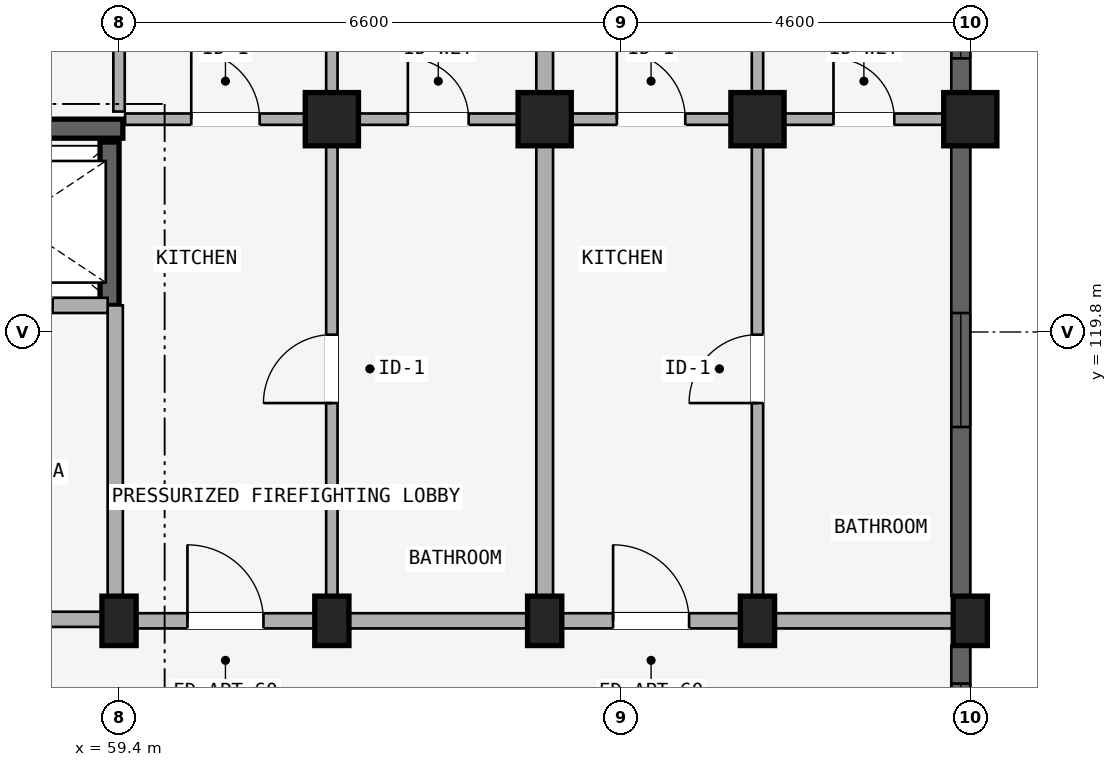
"""IFC4 building model, lengths in metres.
Left out: names, types, materials, properties, quantities, classifications, styles, units other than length and angle.
Written with IfcOpenShell. Run it as: python <this file> out.ifc"""

import sys

from ifc_helpers import new_model, si_unit, direction, frame, frame_2d, origin, origin_2d, place, context, subcontext, project, spatial, rectangle, extrude, element, fill, save


model = new_model("IFC4")
c1 = context("Model", 3, precision=1e-05, world=origin(), true_north=direction((0.0, 1.0)))
c2 = subcontext(c1, "Body", "Model", "MODEL_VIEW")
j1 = project(units=[si_unit("LENGTHUNIT", "METRE"), si_unit("PLANEANGLEUNIT", "RADIAN")], contexts=[c1])
p1 = place(None, origin())
s1 = spatial("IfcSite", under=j1, at=p1, CompositionType="ELEMENT")
p2 = place(p1, origin())
s2 = spatial("IfcBuilding", under=s1, at=p2, CompositionType="ELEMENT")
p3 = place(p2, frame((0.0, 0.0, 27.6)))
s3 = spatial("IfcBuildingStorey", under=s2, at=p3, CompositionType="ELEMENT", Elevation=27.6)
p4 = place(p3, frame((56.65, 122.475, 0.0), z_axis=(0.0, 0.0, 1.0), x_axis=(1.0, 0.0, 0.0)))
e1 = element("IfcWall", 1, at=p4, inside=s3, PredefinedType="SHEAR", context=c2, shape_type="SweptSolid", body=[
    extrude(rectangle(XDim=2.8, YDim=0.25, at=frame_2d((1.4, 0.0))), origin(), (0.0, 0.0, 1.0), 2.93),
])
p5 = place(p3, frame((59.275, 120.15, 0.0), z_axis=(0.0, 0.0, 1.0), x_axis=(0.0, 1.0, 0.0)))
e2 = element("IfcWall", 2, at=p5, inside=s3, PredefinedType="SHEAR", context=c2, shape_type="SweptSolid", body=[
    extrude(rectangle(XDim=2.15, YDim=0.25, at=frame_2d((1.075, 0.0))), origin(), (0.0, 0.0, 1.0), 2.93),
])
for number, where, z_axis, x_axis in (
    (3, (59.4, 116.0, 0.0), (0.0, 0.0, 1.0), (1.0, 0.0, 0.0)),
    (4, (62.2, 116.0, 0.0), (0.0, 0.0, 1.0), (1.0, 0.0, 0.0)),
):
    element("IfcColumn", number, at=place(p3, frame(where, z_axis=z_axis, x_axis=x_axis)), inside=s3, PredefinedType="COLUMN", context=c2, shape_type="SweptSolid", body=[
        extrude(rectangle(XDim=0.45, YDim=0.65, at=origin_2d()), origin(), (0.0, 0.0, 1.0), 2.93),
    ])
p6 = place(p3, frame((62.2, 122.6, 0.0), z_axis=(0.0, 0.0, 1.0), x_axis=(1.0, 0.0, 0.0)))
e5 = element("IfcColumn", 5, at=p6, inside=s3, PredefinedType="COLUMN", context=c2, shape_type="SweptSolid", body=[
    extrude(rectangle(XDim=0.7, YDim=0.7, at=origin_2d()), origin(), (0.0, 0.0, 1.0), 2.93),
])
p7 = place(p3, frame((65.0, 116.0, 0.0), z_axis=(0.0, 0.0, 1.0), x_axis=(1.0, 0.0, 0.0)))
e6 = element("IfcColumn", 6, at=p7, inside=s3, PredefinedType="COLUMN", context=c2, shape_type="SweptSolid", body=[
    extrude(rectangle(XDim=0.45, YDim=0.65, at=origin_2d()), origin(), (0.0, 0.0, 1.0), 2.93),
])
p8 = place(p3, frame((65.0, 122.6, 0.0), z_axis=(0.0, 0.0, 1.0), x_axis=(1.0, 0.0, 0.0)))
e7 = element("IfcColumn", 7, at=p8, inside=s3, PredefinedType="COLUMN", context=c2, shape_type="SweptSolid", body=[
    extrude(rectangle(XDim=0.7, YDim=0.7, at=origin_2d()), origin(), (0.0, 0.0, 1.0), 2.93),
])
p9 = place(p3, frame((67.8, 116.0, 0.0), z_axis=(0.0, 0.0, 1.0), x_axis=(1.0, 0.0, 0.0)))
e8 = element("IfcColumn", 8, at=p9, inside=s3, PredefinedType="COLUMN", context=c2, shape_type="SweptSolid", body=[
    extrude(rectangle(XDim=0.45, YDim=0.65, at=origin_2d()), origin(), (0.0, 0.0, 1.0), 2.93),
])
p10 = place(p3, frame((67.8, 122.6, 0.0), z_axis=(0.0, 0.0, 1.0), x_axis=(1.0, 0.0, 0.0)))
e9 = element("IfcColumn", 9, at=p10, inside=s3, PredefinedType="COLUMN", context=c2, shape_type="SweptSolid", body=[
    extrude(rectangle(XDim=0.7, YDim=0.7, at=origin_2d()), origin(), (0.0, 0.0, 1.0), 2.93),
])
p11 = place(p3, frame((70.6, 116.0, 0.0), z_axis=(0.0, 0.0, 1.0), x_axis=(1.0, 0.0, 0.0)))
e10 = element("IfcColumn", 10, at=p11, inside=s3, PredefinedType="COLUMN", context=c2, shape_type="SweptSolid", body=[
    extrude(rectangle(XDim=0.45, YDim=0.65, at=origin_2d()), origin(), (0.0, 0.0, 1.0), 2.93),
])
p12 = place(p3, frame((70.6, 122.6, 0.0), z_axis=(0.0, 0.0, 1.0), x_axis=(1.0, 0.0, 0.0)))
e11 = element("IfcColumn", 11, at=p12, inside=s3, PredefinedType="COLUMN", context=c2, shape_type="SweptSolid", body=[
    extrude(rectangle(XDim=0.7, YDim=0.7, at=origin_2d()), origin(), (0.0, 0.0, 1.0), 2.93),
])
p13 = place(p3, frame((53.7, 116.02, 0.0), z_axis=(0.0, 0.0, 1.0), x_axis=(1.0, 0.0, 0.0)))
e12 = element("IfcWall", 12, at=p13, inside=s3, PredefinedType="STANDARD", context=c2, shape_type="SweptSolid", body=[
    extrude(rectangle(XDim=5.65, YDim=0.2, at=frame_2d((2.825, 0.0))), origin(), (0.0, 0.0, 1.0), 2.372),
])
p14 = place(p13, frame((1.923, 0.0, 0.0)))
e13 = element("IfcOpeningElement", 13, at=p14, cuts=e12, PredefinedType="OPENING", context=c2, shape_type="SweptSolid", body=[
    extrude(rectangle(XDim=1.24, YDim=2.15, at=frame_2d((0.62, 1.075))), frame((0.0, 0.11, 0.0), z_axis=(0.0, -1.0, 0.0), x_axis=(1.0, 0.0, 0.0)), (0.0, 0.0, 1.0), 0.22),
])
p15 = place(p3, frame((59.35, 116.02, 0.0), z_axis=(0.0, 0.0, 1.0), x_axis=(0.0, 1.0, 0.0)))
e14 = element("IfcWall", 14, at=p15, inside=s3, PredefinedType="STANDARD", context=c2, shape_type="SweptSolid", body=[
    extrude(rectangle(XDim=4.13, YDim=0.2, at=frame_2d((2.065, 0.0))), origin(), (0.0, 0.0, 1.0), 2.372),
])
p16 = place(p3, frame((56.7, 120.15, 0.0), z_axis=(0.0, 0.0, 1.0), x_axis=(1.0, 0.0, 0.0)))
e15 = element("IfcWall", 15, at=p16, inside=s3, PredefinedType="STANDARD", context=c2, shape_type="SweptSolid", body=[
    extrude(rectangle(XDim=2.55, YDim=0.2, at=frame_2d((1.275, 0.0))), origin(), (0.0, 0.0, 1.0), 2.372),
])
p17 = place(p16, frame((0.725, 0.0, 0.0)))
e16 = element("IfcOpeningElement", 16, at=p17, cuts=e15, PredefinedType="OPENING", context=c2, shape_type="SweptSolid", body=[
    extrude(rectangle(XDim=1.1, YDim=2.15, at=frame_2d((0.55, 1.075))), frame((0.0, 0.11, 0.0), z_axis=(0.0, -1.0, 0.0), x_axis=(1.0, 0.0, 0.0)), (0.0, 0.0, 1.0), 0.22),
])
p18 = place(p3, frame((59.4, 116.0, 0.0), z_axis=(0.0, 0.0, 1.0), x_axis=(1.0, 0.0, 0.0)))
e17 = element("IfcWall", 17, at=p18, inside=s3, PredefinedType="STANDARD", context=c2, shape_type="SweptSolid", body=[
    extrude(rectangle(XDim=2.8, YDim=0.2, at=frame_2d((1.4, 0.0))), origin(), (0.0, 0.0, 1.0), 2.372),
])
p19 = place(p18, frame((0.9, 0.0, 0.0)))
e18 = element("IfcOpeningElement", 18, at=p19, cuts=e17, PredefinedType="OPENING", context=c2, shape_type="SweptSolid", body=[
    extrude(rectangle(XDim=1.0, YDim=2.15, at=frame_2d((0.5, 1.075))), frame((0.0, 0.11, 0.0), z_axis=(0.0, -1.0, 0.0), x_axis=(1.0, 0.0, 0.0)), (0.0, 0.0, 1.0), 0.22),
])
p20 = place(p3, frame((59.48, 122.6, 0.0), z_axis=(0.0, 0.0, 1.0), x_axis=(1.0, 0.0, 0.0)))
e19 = element("IfcWall", 19, at=p20, inside=s3, PredefinedType="PLUMBINGWALL", context=c2, shape_type="SweptSolid", body=[
    extrude(rectangle(XDim=2.64, YDim=0.15, at=frame_2d((1.32, 0.0))), origin(), (0.0, 0.0, 1.0), 2.372),
])
p21 = place(p20, frame((0.87, 0.0, 0.0)))
e20 = element("IfcOpeningElement", 20, at=p21, cuts=e19, PredefinedType="OPENING", context=c2, shape_type="SweptSolid", body=[
    extrude(rectangle(XDim=0.9, YDim=2.1, at=frame_2d((0.45, 1.05))), frame((0.0, 0.085, 0.0), z_axis=(0.0, -1.0, 0.0), x_axis=(1.0, 0.0, 0.0)), (0.0, 0.0, 1.0), 0.17),
])
p22 = place(p3, frame((62.2, 116.0, 0.0), z_axis=(0.0, 0.0, 1.0), x_axis=(1.0, 0.0, 0.0)))
e21 = element("IfcWall", 21, at=p22, inside=s3, PredefinedType="STANDARD", context=c2, shape_type="SweptSolid", body=[
    extrude(rectangle(XDim=2.8, YDim=0.2, at=frame_2d((1.4, 0.0))), origin(), (0.0, 0.0, 1.0), 2.372),
])
p23 = place(p3, frame((62.28, 122.6, 0.0), z_axis=(0.0, 0.0, 1.0), x_axis=(1.0, 0.0, 0.0)))
e22 = element("IfcWall", 22, at=p23, inside=s3, PredefinedType="PLUMBINGWALL", context=c2, shape_type="SweptSolid", body=[
    extrude(rectangle(XDim=2.64, YDim=0.15, at=frame_2d((1.32, 0.0))), origin(), (0.0, 0.0, 1.0), 2.372),
])
p24 = place(p23, frame((0.92, 0.0, 0.0)))
e23 = element("IfcOpeningElement", 23, at=p24, cuts=e22, PredefinedType="OPENING", context=c2, shape_type="SweptSolid", body=[
    extrude(rectangle(XDim=0.8, YDim=2.1, at=frame_2d((0.4, 1.05))), frame((0.0, 0.085, 0.0), z_axis=(0.0, -1.0, 0.0), x_axis=(1.0, 0.0, 0.0)), (0.0, 0.0, 1.0), 0.17),
])
p25 = place(p3, frame((65.0, 116.0, 0.0), z_axis=(0.0, 0.0, 1.0), x_axis=(1.0, 0.0, 0.0)))
e24 = element("IfcWall", 24, at=p25, inside=s3, PredefinedType="STANDARD", context=c2, shape_type="SweptSolid", body=[
    extrude(rectangle(XDim=2.8, YDim=0.2, at=frame_2d((1.4, 0.0))), origin(), (0.0, 0.0, 1.0), 2.372),
])
p26 = place(p25, frame((0.9, 0.0, 0.0)))
e25 = element("IfcOpeningElement", 25, at=p26, cuts=e24, PredefinedType="OPENING", context=c2, shape_type="SweptSolid", body=[
    extrude(rectangle(XDim=1.0, YDim=2.15, at=frame_2d((0.5, 1.075))), frame((0.0, 0.11, 0.0), z_axis=(0.0, -1.0, 0.0), x_axis=(1.0, 0.0, 0.0)), (0.0, 0.0, 1.0), 0.22),
])
p27 = place(p3, frame((65.08, 122.6, 0.0), z_axis=(0.0, 0.0, 1.0), x_axis=(1.0, 0.0, 0.0)))
e26 = element("IfcWall", 26, at=p27, inside=s3, PredefinedType="PLUMBINGWALL", context=c2, shape_type="SweptSolid", body=[
    extrude(rectangle(XDim=2.64, YDim=0.15, at=frame_2d((1.32, 0.0))), origin(), (0.0, 0.0, 1.0), 2.372),
])
p28 = place(p27, frame((0.87, 0.0, 0.0)))
e27 = element("IfcOpeningElement", 27, at=p28, cuts=e26, PredefinedType="OPENING", context=c2, shape_type="SweptSolid", body=[
    extrude(rectangle(XDim=0.9, YDim=2.1, at=frame_2d((0.45, 1.05))), frame((0.0, 0.085, 0.0), z_axis=(0.0, -1.0, 0.0), x_axis=(1.0, 0.0, 0.0)), (0.0, 0.0, 1.0), 0.17),
])
p29 = place(p3, frame((67.8, 116.0, 0.0), z_axis=(0.0, 0.0, 1.0), x_axis=(1.0, 0.0, 0.0)))
e28 = element("IfcWall", 28, at=p29, inside=s3, PredefinedType="STANDARD", context=c2, shape_type="SweptSolid", body=[
    extrude(rectangle(XDim=2.8, YDim=0.2, at=frame_2d((1.4, 0.0))), origin(), (0.0, 0.0, 1.0), 2.372),
])
p30 = place(p3, frame((67.88, 122.6, 0.0), z_axis=(0.0, 0.0, 1.0), x_axis=(1.0, 0.0, 0.0)))
e29 = element("IfcWall", 29, at=p30, inside=s3, PredefinedType="PLUMBINGWALL", context=c2, shape_type="SweptSolid", body=[
    extrude(rectangle(XDim=2.64, YDim=0.15, at=frame_2d((1.32, 0.0))), origin(), (0.0, 0.0, 1.0), 2.372),
])
p31 = place(p30, frame((0.92, 0.0, 0.0)))
e30 = element("IfcOpeningElement", 30, at=p31, cuts=e29, PredefinedType="OPENING", context=c2, shape_type="SweptSolid", body=[
    extrude(rectangle(XDim=0.8, YDim=2.1, at=frame_2d((0.4, 1.05))), frame((0.0, 0.085, 0.0), z_axis=(0.0, -1.0, 0.0), x_axis=(1.0, 0.0, 0.0)), (0.0, 0.0, 1.0), 0.17),
])
p32 = place(p3, frame((59.4, 122.7, 0.0), z_axis=(0.0, 0.0, 1.0), x_axis=(0.0, 1.0, 0.0)))
e31 = element("IfcWall", 31, at=p32, inside=s3, PredefinedType="PARTITIONING", context=c2, shape_type="SweptSolid", body=[
    extrude(rectangle(XDim=10.82, YDim=0.15, at=frame_2d((5.41, 0.0))), origin(), (0.0, 0.0, 1.0), 2.372),
])
p33 = place(p32, frame((0.899, 0.0, 0.0)))
e32 = element("IfcOpeningElement", 32, at=p33, cuts=e31, PredefinedType="OPENING", context=c2, shape_type="SweptSolid", body=[
    extrude(rectangle(XDim=0.8, YDim=2.1, at=frame_2d((0.4, 1.05))), frame((0.0, 0.085, 0.0), z_axis=(0.0, -1.0, 0.0), x_axis=(1.0, 0.0, 0.0)), (0.0, 0.0, 1.0), 0.17),
])
p34 = place(p3, frame((62.2, 116.05, 0.0), z_axis=(0.0, 0.0, 1.0), x_axis=(0.0, 1.0, 0.0)))
e33 = element("IfcWall", 33, at=p34, inside=s3, PredefinedType="PARTITIONING", context=c2, shape_type="SweptSolid", body=[
    extrude(rectangle(XDim=6.53, YDim=0.15, at=frame_2d((3.265, 0.0))), origin(), (0.0, 0.0, 1.0), 2.372),
])
p35 = place(p34, frame((2.815, 0.0, 0.0)))
e34 = element("IfcOpeningElement", 34, at=p35, cuts=e33, PredefinedType="OPENING", context=c2, shape_type="SweptSolid", body=[
    extrude(rectangle(XDim=0.9, YDim=2.1, at=frame_2d((0.45, 1.05))), frame((0.0, 0.085, 0.0), z_axis=(0.0, -1.0, 0.0), x_axis=(1.0, 0.0, 0.0)), (0.0, 0.0, 1.0), 0.17),
])
p36 = place(p3, frame((62.2, 122.7, 0.0), z_axis=(0.0, 0.0, 1.0), x_axis=(0.0, 1.0, 0.0)))
e35 = element("IfcWall", 35, at=p36, inside=s3, PredefinedType="PARTITIONING", context=c2, shape_type="SweptSolid", body=[
    extrude(rectangle(XDim=10.82, YDim=0.15, at=frame_2d((5.41, 0.0))), origin(), (0.0, 0.0, 1.0), 2.372),
])
p37 = place(p36, frame((0.899, 0.0, 0.0)))
e36 = element("IfcOpeningElement", 36, at=p37, cuts=e35, PredefinedType="OPENING", context=c2, shape_type="SweptSolid", body=[
    extrude(rectangle(XDim=0.8, YDim=2.1, at=frame_2d((0.4, 1.05))), frame((0.0, 0.085, 0.0), z_axis=(0.0, -1.0, 0.0), x_axis=(1.0, 0.0, 0.0)), (0.0, 0.0, 1.0), 0.17),
])
p38 = place(p3, frame((65.0, 116.05, 0.0), z_axis=(0.0, 0.0, 1.0), x_axis=(0.0, 1.0, 0.0)))
e37 = element("IfcWall", 37, at=p38, inside=s3, PredefinedType="STANDARD", context=c2, shape_type="SweptSolid", body=[
    extrude(rectangle(XDim=6.53, YDim=0.22, at=frame_2d((3.265, 0.0))), origin(), (0.0, 0.0, 1.0), 2.372),
])
p39 = place(p3, frame((65.0, 122.7, 0.0), z_axis=(0.0, 0.0, 1.0), x_axis=(0.0, 1.0, 0.0)))
e38 = element("IfcWall", 38, at=p39, inside=s3, PredefinedType="STANDARD", context=c2, shape_type="SweptSolid", body=[
    extrude(rectangle(XDim=10.82, YDim=0.22, at=frame_2d((5.41, 0.0))), origin(), (0.0, 0.0, 1.0), 2.372),
])
p40 = place(p3, frame((67.8, 116.05, 0.0), z_axis=(0.0, 0.0, 1.0), x_axis=(0.0, 1.0, 0.0)))
e39 = element("IfcWall", 39, at=p40, inside=s3, PredefinedType="PARTITIONING", context=c2, shape_type="SweptSolid", body=[
    extrude(rectangle(XDim=6.53, YDim=0.15, at=frame_2d((3.265, 0.0))), origin(), (0.0, 0.0, 1.0), 2.372),
])
p41 = place(p40, frame((2.815, 0.0, 0.0)))
e40 = element("IfcOpeningElement", 40, at=p41, cuts=e39, PredefinedType="OPENING", context=c2, shape_type="SweptSolid", body=[
    extrude(rectangle(XDim=0.9, YDim=2.1, at=frame_2d((0.45, 1.05))), frame((0.0, 0.085, 0.0), z_axis=(0.0, -1.0, 0.0), x_axis=(1.0, 0.0, 0.0)), (0.0, 0.0, 1.0), 0.17),
])
p42 = place(p3, frame((67.8, 122.7, 0.0), z_axis=(0.0, 0.0, 1.0), x_axis=(0.0, 1.0, 0.0)))
e41 = element("IfcWall", 41, at=p42, inside=s3, PredefinedType="PARTITIONING", context=c2, shape_type="SweptSolid", body=[
    extrude(rectangle(XDim=10.82, YDim=0.15, at=frame_2d((5.41, 0.0))), origin(), (0.0, 0.0, 1.0), 2.372),
])
p43 = place(p42, frame((0.899, 0.0, 0.0)))
e42 = element("IfcOpeningElement", 42, at=p43, cuts=e41, PredefinedType="OPENING", context=c2, shape_type="SweptSolid", body=[
    extrude(rectangle(XDim=0.8, YDim=2.1, at=frame_2d((0.4, 1.05))), frame((0.0, 0.085, 0.0), z_axis=(0.0, -1.0, 0.0), x_axis=(1.0, 0.0, 0.0)), (0.0, 0.0, 1.0), 0.17),
])
p44 = place(p3, frame((70.475, 113.928, 0.0), z_axis=(0.0, 0.0, 1.0), x_axis=(0.0, 1.0, 0.0)))
e43 = element("IfcWall", 43, at=p44, inside=s3, PredefinedType="STANDARD", context=c2, shape_type="SweptSolid", body=[
    extrude(rectangle(XDim=1.743, YDim=0.25, at=frame_2d((0.872, 0.0))), origin(), (0.0, 0.0, 1.0), 2.372),
])
p45 = place(p44, frame((0.497, 0.0, 0.88)))
e44 = element("IfcOpeningElement", 44, at=p45, cuts=e43, PredefinedType="OPENING", context=c2, shape_type="SweptSolid", body=[
    extrude(rectangle(XDim=0.75, YDim=1.05, at=frame_2d((0.375, 0.525))), frame((0.0, 0.135, 0.0), z_axis=(0.0, -1.0, 0.0), x_axis=(1.0, 0.0, 0.0)), (0.0, 0.0, 1.0), 0.27),
])
p46 = place(p3, frame((70.475, 116.329, 0.0), z_axis=(0.0, 0.0, 1.0), x_axis=(0.0, 1.0, 0.0)))
e45 = element("IfcWall", 45, at=p46, inside=s3, PredefinedType="STANDARD", context=c2, shape_type="SweptSolid", body=[
    extrude(rectangle(XDim=5.918, YDim=0.25, at=frame_2d((2.959, 0.0))), origin(), (0.0, 0.0, 1.0), 2.372),
])
p47 = place(p46, frame((2.221, 0.0, 0.522)))
e46 = element("IfcOpeningElement", 46, at=p47, cuts=e45, PredefinedType="OPENING", context=c2, shape_type="SweptSolid", body=[
    extrude(rectangle(XDim=1.5, YDim=1.65, at=frame_2d((0.75, 0.825))), frame((0.0, 0.135, 0.0), z_axis=(0.0, -1.0, 0.0), x_axis=(1.0, 0.0, 0.0)), (0.0, 0.0, 1.0), 0.27),
])
p48 = place(p3, frame((70.475, 122.954, 0.0), z_axis=(0.0, 0.0, 1.0), x_axis=(0.0, 1.0, 0.0)))
e47 = element("IfcWall", 47, at=p48, inside=s3, PredefinedType="STANDARD", context=c2, shape_type="SweptSolid", body=[
    extrude(rectangle(XDim=2.093, YDim=0.25, at=frame_2d((1.046, 0.0))), origin(), (0.0, 0.0, 1.0), 2.372),
])
p49 = place(p48, frame((0.447, 0.0, 0.672)))
e48 = element("IfcOpeningElement", 48, at=p49, cuts=e47, PredefinedType="OPENING", context=c2, shape_type="SweptSolid", body=[
    extrude(rectangle(XDim=1.2, YDim=1.5, at=frame_2d((0.6, 0.75))), frame((0.0, 0.135, 0.0), z_axis=(0.0, -1.0, 0.0), x_axis=(1.0, 0.0, 0.0)), (0.0, 0.0, 1.0), 0.27),
])
p50 = place(p45, origin())
e49 = element("IfcWindow", 49, at=p50, inside=s3, PartitioningType="SINGLE_PANEL", PredefinedType="WINDOW", context=c2, shape_type="SweptSolid", body=[
    extrude(rectangle(XDim=0.75, YDim=1.05, at=frame_2d((0.375, 0.525))), frame((0.0, 0.03, 0.0), z_axis=(0.0, -1.0, 0.0), x_axis=(1.0, 0.0, 0.0)), (0.0, 0.0, 1.0), 0.06),
])
fill(e44, e49)
p51 = place(p47, origin())
e50 = element("IfcWindow", 50, at=p51, inside=s3, PartitioningType="DOUBLE_PANEL_VERTICAL", PredefinedType="WINDOW", context=c2, shape_type="SweptSolid", body=[
    extrude(rectangle(XDim=1.5, YDim=1.65, at=frame_2d((0.75, 0.825))), frame((0.0, 0.03, 0.0), z_axis=(0.0, -1.0, 0.0), x_axis=(1.0, 0.0, 0.0)), (0.0, 0.0, 1.0), 0.06),
])
fill(e46, e50)
p52 = place(p49, origin())
e51 = element("IfcWindow", 51, at=p52, inside=s3, PartitioningType="SINGLE_PANEL", PredefinedType="WINDOW", context=c2, shape_type="SweptSolid", body=[
    extrude(rectangle(XDim=1.2, YDim=1.5, at=frame_2d((0.6, 0.75))), frame((0.0, 0.03, 0.0), z_axis=(0.0, -1.0, 0.0), x_axis=(1.0, 0.0, 0.0)), (0.0, 0.0, 1.0), 0.06),
])
fill(e48, e51)
p53 = place(p17, origin())
e52 = element("IfcDoor", 52, at=p53, inside=s3, OperationType="SLIDING_TO_LEFT", PredefinedType="DOOR", context=c2, shape_type="SweptSolid", body=[
    extrude(rectangle(XDim=1.1, YDim=2.15, at=frame_2d((0.55, 1.075))), frame((0.0, 0.025, 0.0), z_axis=(0.0, -1.0, 0.0), x_axis=(1.0, 0.0, 0.0)), (0.0, 0.0, 1.0), 0.05),
])
fill(e16, e52)
p54 = place(p21, frame((0.9, 0.0, 0.0), z_axis=(0.0, 0.0, 1.0), x_axis=(-1.0, 0.0, 0.0)))
e53 = element("IfcDoor", 53, at=p54, inside=s3, OperationType="SINGLE_SWING_RIGHT", PredefinedType="DOOR", context=c2, shape_type="SweptSolid", body=[
    extrude(rectangle(XDim=0.9, YDim=2.1, at=frame_2d((0.45, 1.05))), frame((0.0, 0.025, 0.0), z_axis=(0.0, -1.0, 0.0), x_axis=(1.0, 0.0, 0.0)), (0.0, 0.0, 1.0), 0.05),
])
fill(e20, e53)
p55 = place(p19, origin())
e54 = element("IfcDoor", 54, at=p55, inside=s3, OperationType="SINGLE_SWING_LEFT", PredefinedType="DOOR", context=c2, shape_type="SweptSolid", body=[
    extrude(rectangle(XDim=1.0, YDim=2.15, at=frame_2d((0.5, 1.075))), frame((0.0, 0.025, 0.0), z_axis=(0.0, -1.0, 0.0), x_axis=(1.0, 0.0, 0.0)), (0.0, 0.0, 1.0), 0.05),
])
fill(e18, e54)
p56 = place(p24, frame((0.8, 0.0, 0.0), z_axis=(0.0, 0.0, 1.0), x_axis=(-1.0, 0.0, 0.0)))
e55 = element("IfcDoor", 55, at=p56, inside=s3, OperationType="SINGLE_SWING_RIGHT", PredefinedType="DOOR", context=c2, shape_type="SweptSolid", body=[
    extrude(rectangle(XDim=0.8, YDim=2.1, at=frame_2d((0.4, 1.05))), frame((0.0, 0.025, 0.0), z_axis=(0.0, -1.0, 0.0), x_axis=(1.0, 0.0, 0.0)), (0.0, 0.0, 1.0), 0.05),
])
fill(e23, e55)
p57 = place(p28, frame((0.9, 0.0, 0.0), z_axis=(0.0, 0.0, 1.0), x_axis=(-1.0, 0.0, 0.0)))
e56 = element("IfcDoor", 56, at=p57, inside=s3, OperationType="SINGLE_SWING_RIGHT", PredefinedType="DOOR", context=c2, shape_type="SweptSolid", body=[
    extrude(rectangle(XDim=0.9, YDim=2.1, at=frame_2d((0.45, 1.05))), frame((0.0, 0.025, 0.0), z_axis=(0.0, -1.0, 0.0), x_axis=(1.0, 0.0, 0.0)), (0.0, 0.0, 1.0), 0.05),
])
fill(e27, e56)
p58 = place(p26, origin())
e57 = element("IfcDoor", 57, at=p58, inside=s3, OperationType="SINGLE_SWING_LEFT", PredefinedType="DOOR", context=c2, shape_type="SweptSolid", body=[
    extrude(rectangle(XDim=1.0, YDim=2.15, at=frame_2d((0.5, 1.075))), frame((0.0, 0.025, 0.0), z_axis=(0.0, -1.0, 0.0), x_axis=(1.0, 0.0, 0.0)), (0.0, 0.0, 1.0), 0.05),
])
fill(e25, e57)
p59 = place(p31, frame((0.8, 0.0, 0.0), z_axis=(0.0, 0.0, 1.0), x_axis=(-1.0, 0.0, 0.0)))
e58 = element("IfcDoor", 58, at=p59, inside=s3, OperationType="SINGLE_SWING_RIGHT", PredefinedType="DOOR", context=c2, shape_type="SweptSolid", body=[
    extrude(rectangle(XDim=0.8, YDim=2.1, at=frame_2d((0.4, 1.05))), frame((0.0, 0.025, 0.0), z_axis=(0.0, -1.0, 0.0), x_axis=(1.0, 0.0, 0.0)), (0.0, 0.0, 1.0), 0.05),
])
fill(e30, e58)
p60 = place(p35, origin())
e59 = element("IfcDoor", 59, at=p60, inside=s3, OperationType="SINGLE_SWING_LEFT", PredefinedType="DOOR", context=c2, shape_type="SweptSolid", body=[
    extrude(rectangle(XDim=0.9, YDim=2.1, at=frame_2d((0.45, 1.05))), frame((0.0, 0.025, 0.0), z_axis=(0.0, -1.0, 0.0), x_axis=(1.0, 0.0, 0.0)), (0.0, 0.0, 1.0), 0.05),
])
fill(e34, e59)
p61 = place(p41, frame((0.9, 0.0, 0.0), z_axis=(0.0, 0.0, 1.0), x_axis=(-1.0, 0.0, 0.0)))
e60 = element("IfcDoor", 60, at=p61, inside=s3, OperationType="SINGLE_SWING_RIGHT", PredefinedType="DOOR", context=c2, shape_type="SweptSolid", body=[
    extrude(rectangle(XDim=0.9, YDim=2.1, at=frame_2d((0.45, 1.05))), frame((0.0, 0.025, 0.0), z_axis=(0.0, -1.0, 0.0), x_axis=(1.0, 0.0, 0.0)), (0.0, 0.0, 1.0), 0.05),
])
fill(e40, e60)
save(model, sys.argv[1])
